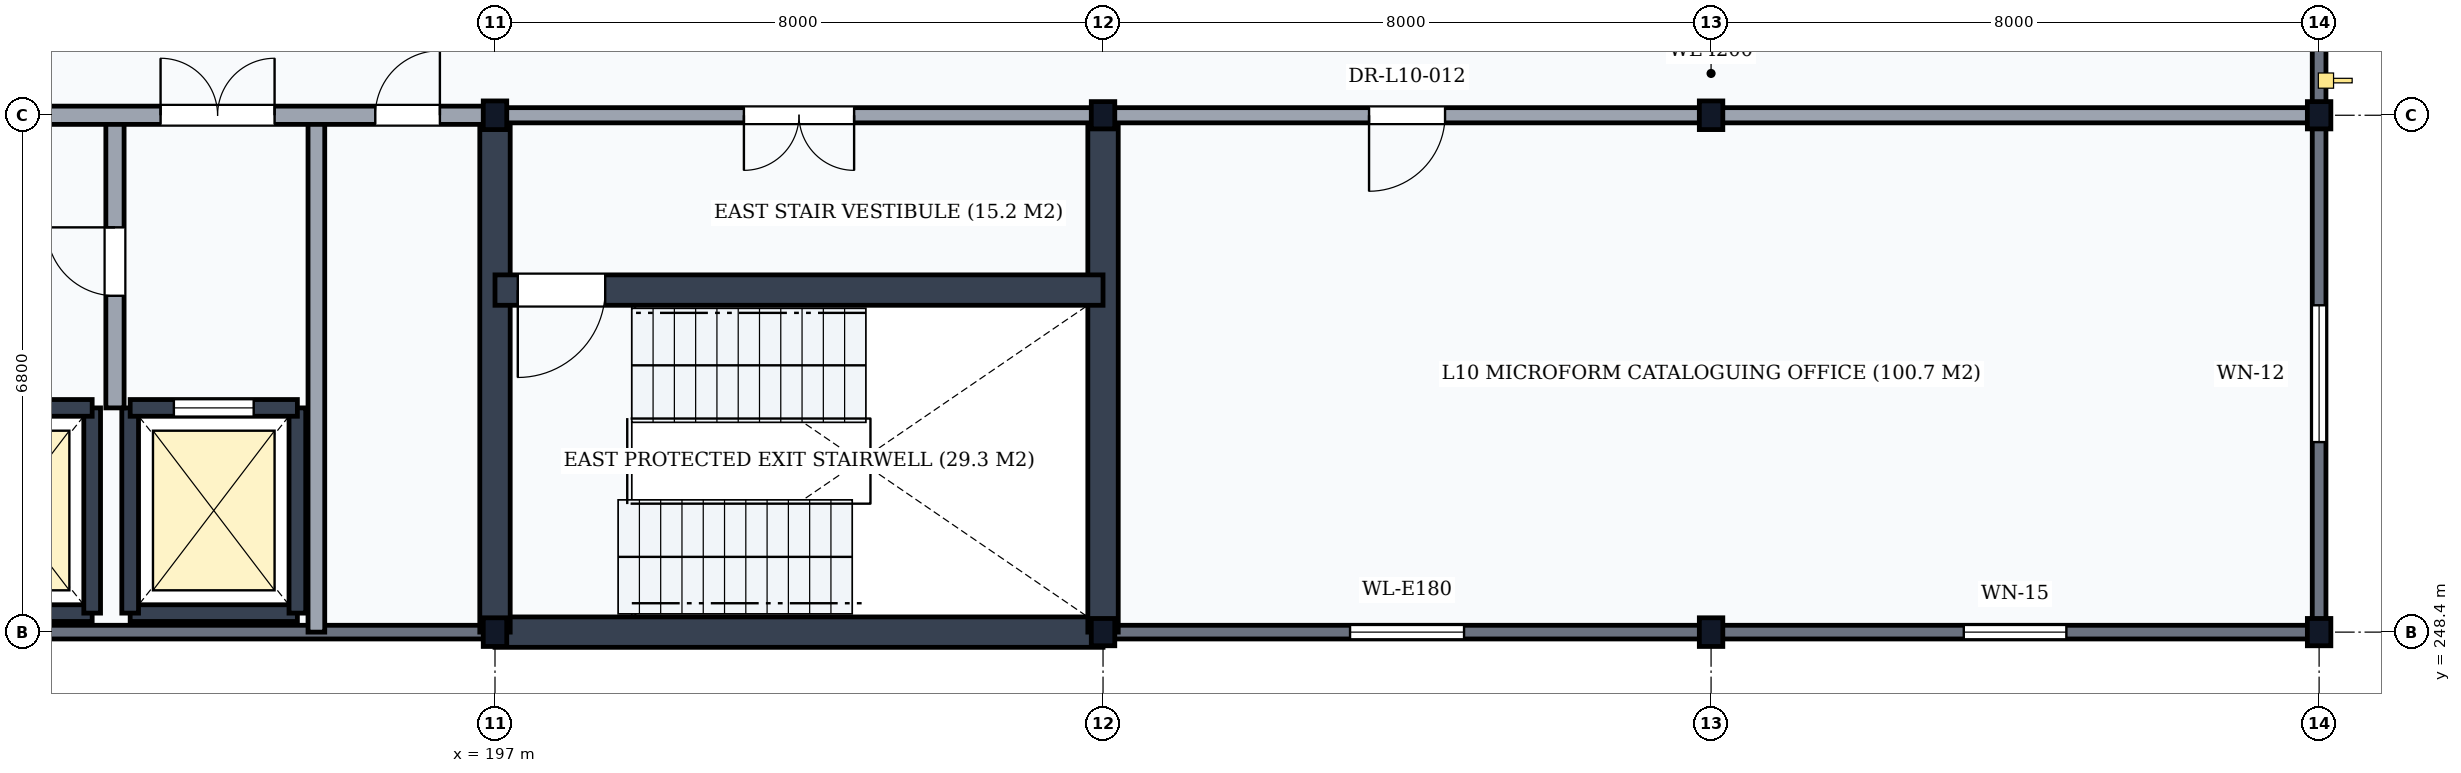
"""IFC4 building model, lengths in metres.
Left out: names, types, materials, properties, quantities, classifications, styles, units other than length and angle.
Written with IfcOpenShell. Run it as: python <this file> out.ifc"""

import sys

from ifc_helpers import new_model, si_unit, direction, frame, frame_2d, origin, origin_2d, place, context, subcontext, project, spatial, rectangle, i_section, extrude, element, fill, save


model = new_model("IFC4")
c1 = context("Model", 3, precision=1e-05, world=origin(), true_north=direction((0.0, 1.0)))
c2 = subcontext(c1, "Body", "Model", "MODEL_VIEW")
j1 = project(units=[si_unit("LENGTHUNIT", "METRE"), si_unit("PLANEANGLEUNIT", "RADIAN")], contexts=[c1])
p1 = place(None, origin())
s1 = spatial("IfcSite", under=j1, at=p1, CompositionType="ELEMENT")
p2 = place(p1, origin())
s2 = spatial("IfcBuilding", under=s1, at=p2, CompositionType="ELEMENT")
p3 = place(p2, frame((0.0, 0.0, 39.9)))
s3 = spatial("IfcBuildingStorey", under=s2, at=p3, CompositionType="ELEMENT", Elevation=39.9)
for number, where, z_axis, x_axis in (
    (1, (197.0, 248.4, 0.0), (0.0, 0.0, 1.0), (1.0, 0.0, 0.0)),
    (2, (197.0, 255.2, 0.0), (0.0, 0.0, 1.0), (1.0, 0.0, 0.0)),
):
    element("IfcColumn", number, at=place(p3, frame(where, z_axis=z_axis, x_axis=x_axis)), inside=s3, PredefinedType="COLUMN", context=c2, shape_type="SweptSolid", body=[
        extrude(i_section(OverallWidth=0.309, OverallDepth=0.377, WebThickness=0.021, FlangeThickness=0.04, FilletRadius=0.027, at=origin_2d()), origin(), (0.0, 0.0, 1.0), 3.9),
    ])
for number, where, z_axis, x_axis in (
    (3, (205.0, 248.4, 0.0), (0.0, 0.0, 1.0), (1.0, 0.0, 0.0)),
    (4, (205.0, 255.2, 0.0), (0.0, 0.0, 1.0), (1.0, 0.0, 0.0)),
):
    element("IfcColumn", number, at=place(p3, frame(where, z_axis=z_axis, x_axis=x_axis)), inside=s3, PredefinedType="COLUMN", context=c2, shape_type="SweptSolid", body=[
        extrude(i_section(OverallWidth=0.309, OverallDepth=0.359, WebThickness=0.021, FlangeThickness=0.04, FilletRadius=0.027, at=origin_2d()), origin(), (0.0, 0.0, 1.0), 3.9),
    ])
for number, where, z_axis, x_axis in (
    (5, (213.0, 248.4, 0.0), (0.0, 0.0, 1.0), (1.0, 0.0, 0.0)),
    (6, (213.0, 255.2, 0.0), (0.0, 0.0, 1.0), (1.0, 0.0, 0.0)),
):
    element("IfcColumn", number, at=place(p3, frame(where, z_axis=z_axis, x_axis=x_axis)), inside=s3, PredefinedType="COLUMN", context=c2, shape_type="SweptSolid", body=[
        extrude(i_section(OverallWidth=0.309, OverallDepth=0.377, WebThickness=0.021, FlangeThickness=0.04, FilletRadius=0.027, at=origin_2d()), origin(), (0.0, 0.0, 1.0), 3.9),
    ])
for number, where, z_axis, x_axis in (
    (7, (221.0, 248.4, 0.0), (0.0, 0.0, 1.0), (1.0, 0.0, 0.0)),
    (8, (221.0, 255.2, 0.0), (0.0, 0.0, 1.0), (1.0, 0.0, 0.0)),
):
    element("IfcColumn", number, at=place(p3, frame(where, z_axis=z_axis, x_axis=x_axis)), inside=s3, PredefinedType="COLUMN", context=c2, shape_type="SweptSolid", body=[
        extrude(i_section(OverallWidth=0.309, OverallDepth=0.359, WebThickness=0.021, FlangeThickness=0.04, FilletRadius=0.027, at=origin_2d()), origin(), (0.0, 0.0, 1.0), 3.9),
    ])
p4 = place(p3, frame((189.006, 248.4, 0.0), z_axis=(0.0, 0.0, 1.0), x_axis=(1.0, 0.0, 0.0)))
e9 = element("IfcWall", 9, at=p4, inside=s3, PredefinedType="SOLIDWALL", context=c2, shape_type="SweptSolid", body=[
    extrude(rectangle(XDim=7.988, YDim=0.18, at=frame_2d((3.994, 0.0))), origin(), (0.0, 0.0, 1.0), 3.368),
])
p5 = place(p3, frame((205.006, 248.4, 0.0), z_axis=(0.0, 0.0, 1.0), x_axis=(1.0, 0.0, 0.0)))
e10 = element("IfcWall", 10, at=p5, inside=s3, PredefinedType="SOLIDWALL", context=c2, shape_type="SweptSolid", body=[
    extrude(rectangle(XDim=7.988, YDim=0.18, at=frame_2d((3.994, 0.0))), origin(), (0.0, 0.0, 1.0), 3.368),
])
p6 = place(p5, frame((3.244, 0.0, 0.95)))
e11 = element("IfcOpeningElement", 11, at=p6, cuts=e10, PredefinedType="OPENING", context=c2, shape_type="SweptSolid", body=[
    extrude(rectangle(XDim=1.5, YDim=1.9, at=frame_2d((0.75, 0.95))), frame((0.0, 0.105, 0.0), z_axis=(0.0, -1.0, 0.0), x_axis=(1.0, 0.0, 0.0)), (0.0, 0.0, 1.0), 0.21),
])
p7 = place(p3, frame((213.006, 248.4, 0.0), z_axis=(0.0, 0.0, 1.0), x_axis=(1.0, 0.0, 0.0)))
e12 = element("IfcWall", 12, at=p7, inside=s3, PredefinedType="SOLIDWALL", context=c2, shape_type="SweptSolid", body=[
    extrude(rectangle(XDim=7.988, YDim=0.18, at=frame_2d((3.994, 0.0))), origin(), (0.0, 0.0, 1.0), 3.368),
])
p8 = place(p7, frame((3.319, 0.0, 0.95)))
e13 = element("IfcOpeningElement", 13, at=p8, cuts=e12, PredefinedType="OPENING", context=c2, shape_type="SweptSolid", body=[
    extrude(rectangle(XDim=1.35, YDim=1.8, at=frame_2d((0.675, 0.9))), frame((0.0, 0.105, 0.0), z_axis=(0.0, -1.0, 0.0), x_axis=(1.0, 0.0, 0.0)), (0.0, 0.0, 1.0), 0.21),
])
p9 = place(p3, frame((221.0, 248.406, 0.0), z_axis=(0.0, 0.0, 1.0), x_axis=(0.0, 1.0, 0.0)))
e14 = element("IfcWall", 14, at=p9, inside=s3, PredefinedType="SOLIDWALL", context=c2, shape_type="SweptSolid", body=[
    extrude(rectangle(XDim=6.788, YDim=0.18, at=frame_2d((3.394, 0.0))), origin(), (0.0, 0.0, 1.0), 3.448),
])
p10 = place(p9, frame((2.494, 0.0, 0.95)))
e15 = element("IfcOpeningElement", 15, at=p10, cuts=e14, PredefinedType="OPENING", context=c2, shape_type="SweptSolid", body=[
    extrude(rectangle(XDim=1.8, YDim=2.0, at=frame_2d((0.9, 1.0))), frame((0.0, 0.105, 0.0), z_axis=(0.0, -1.0, 0.0), x_axis=(1.0, 0.0, 0.0)), (0.0, 0.0, 1.0), 0.21),
])
p11 = place(p3, frame((221.0, 255.206, 0.0), z_axis=(0.0, 0.0, 1.0), x_axis=(0.0, 1.0, 0.0)))
e16 = element("IfcWall", 16, at=p11, inside=s3, PredefinedType="SOLIDWALL", context=c2, shape_type="SweptSolid", body=[
    extrude(rectangle(XDim=7.588, YDim=0.18, at=frame_2d((3.794, 0.0))), origin(), (0.0, 0.0, 1.0), 3.408),
])
p12 = place(p11, frame((4.266, 0.0, 0.95)))
e17 = element("IfcOpeningElement", 17, at=p12, cuts=e16, PredefinedType="OPENING", context=c2, shape_type="SweptSolid", body=[
    extrude(rectangle(XDim=1.6, YDim=2.0, at=frame_2d((0.8, 1.0))), frame((0.0, 0.105, 0.0), z_axis=(0.0, -1.0, 0.0), x_axis=(1.0, 0.0, 0.0)), (0.0, 0.0, 1.0), 0.21),
])
p13 = place(p3, frame((197.0, 248.4, 0.0), z_axis=(0.0, 0.0, 1.0), x_axis=(1.0, 0.0, 0.0)))
e18 = element("IfcWall", 18, at=p13, inside=s3, PredefinedType="SHEAR", context=c2, shape_type="SweptSolid", body=[
    extrude(rectangle(XDim=8.0, YDim=0.4, at=frame_2d((4.0, 0.0))), origin(), (0.0, 0.0, 1.0), 3.68),
])
for number, where, z_axis, x_axis in (
    (19, (197.0, 248.4, 0.0), (0.0, 0.0, 1.0), (0.0, 1.0, 0.0)),
    (20, (205.0, 248.4, 0.0), (0.0, 0.0, 1.0), (0.0, 1.0, 0.0)),
):
    element("IfcWall", number, at=place(p3, frame(where, z_axis=z_axis, x_axis=x_axis)), inside=s3, PredefinedType="SHEAR", context=c2, shape_type="SweptSolid", body=[
        extrude(rectangle(XDim=6.8, YDim=0.4, at=frame_2d((3.4, 0.0))), origin(), (0.0, 0.0, 1.0), 3.68),
    ])
p14 = place(p3, frame((197.0, 252.9, 0.0), z_axis=(0.0, 0.0, 1.0), x_axis=(1.0, 0.0, 0.0)))
e21 = element("IfcWall", 21, at=p14, inside=s3, PredefinedType="SHEAR", context=c2, shape_type="SweptSolid", body=[
    extrude(rectangle(XDim=8.0, YDim=0.4, at=frame_2d((4.0, 0.0))), origin(), (0.0, 0.0, 1.0), 3.68),
])
p15 = place(p14, frame((0.3, 0.0, 0.0)))
e22 = element("IfcOpeningElement", 22, at=p15, cuts=e21, PredefinedType="OPENING", context=c2, shape_type="SweptSolid", body=[
    extrude(rectangle(XDim=1.15, YDim=2.15, at=frame_2d((0.575, 1.075))), frame((0.0, 0.215, 0.0), z_axis=(0.0, -1.0, 0.0), x_axis=(1.0, 0.0, 0.0)), (0.0, 0.0, 1.0), 0.43),
])
p16 = place(p3, frame((197.0, 255.2, 0.0), z_axis=(0.0, 0.0, 1.0), x_axis=(1.0, 0.0, 0.0)))
e23 = element("IfcWall", 23, at=p16, inside=s3, PredefinedType="PARTITIONING", context=c2, shape_type="SweptSolid", body=[
    extrude(rectangle(XDim=8.0, YDim=0.2, at=frame_2d((4.0, 0.0))), origin(), (0.0, 0.0, 1.0), 3.178),
])
p17 = place(p16, frame((3.275, 0.0, 0.0)))
e24 = element("IfcOpeningElement", 24, at=p17, cuts=e23, PredefinedType="OPENING", context=c2, shape_type="SweptSolid", body=[
    extrude(rectangle(XDim=1.45, YDim=2.2, at=frame_2d((0.725, 1.1))), frame((0.0, 0.115, 0.0), z_axis=(0.0, -1.0, 0.0), x_axis=(1.0, 0.0, 0.0)), (0.0, 0.0, 1.0), 0.23),
])
p18 = place(p3, frame((189.5, 248.65, 0.0), z_axis=(0.0, 0.0, 1.0), x_axis=(1.0, 0.0, 0.0)))
e25 = element("IfcWall", 25, at=p18, inside=s3, PredefinedType="SHEAR", context=c2, shape_type="SweptSolid", body=[
    extrude(rectangle(XDim=2.2, YDim=0.22, at=frame_2d((1.1, 0.0))), origin(), (0.0, 0.0, 1.0), 3.68),
])
p19 = place(p3, frame((191.7, 248.65, 0.0), z_axis=(0.0, 0.0, 1.0), x_axis=(0.0, 1.0, 0.0)))
e26 = element("IfcWall", 26, at=p19, inside=s3, PredefinedType="SHEAR", context=c2, shape_type="SweptSolid", body=[
    extrude(rectangle(XDim=2.7, YDim=0.22, at=frame_2d((1.35, 0.0))), origin(), (0.0, 0.0, 1.0), 3.68),
])
p20 = place(p3, frame((189.5, 251.35, 0.0), z_axis=(0.0, 0.0, 1.0), x_axis=(1.0, 0.0, 0.0)))
e27 = element("IfcWall", 27, at=p20, inside=s3, PredefinedType="SHEAR", context=c2, shape_type="SweptSolid", body=[
    extrude(rectangle(XDim=2.2, YDim=0.22, at=frame_2d((1.1, 0.0))), origin(), (0.0, 0.0, 1.0), 3.68),
])
p21 = place(p20, frame((0.55, 0.0, 0.0)))
e28 = element("IfcOpeningElement", 28, at=p21, cuts=e27, PredefinedType="OPENING", context=c2, shape_type="SweptSolid", body=[
    extrude(rectangle(XDim=1.1, YDim=2.15, at=frame_2d((0.55, 1.075))), frame((0.0, 0.125, 0.0), z_axis=(0.0, -1.0, 0.0), x_axis=(1.0, 0.0, 0.0)), (0.0, 0.0, 1.0), 0.25),
])
p22 = place(p3, frame((192.2, 248.65, 0.0), z_axis=(0.0, 0.0, 1.0), x_axis=(1.0, 0.0, 0.0)))
e29 = element("IfcWall", 29, at=p22, inside=s3, PredefinedType="SHEAR", context=c2, shape_type="SweptSolid", body=[
    extrude(rectangle(XDim=2.2, YDim=0.22, at=frame_2d((1.1, 0.0))), origin(), (0.0, 0.0, 1.0), 3.68),
])
for number, where, z_axis, x_axis in (
    (30, (192.2, 248.65, 0.0), (0.0, 0.0, 1.0), (0.0, 1.0, 0.0)),
    (31, (194.4, 248.65, 0.0), (0.0, 0.0, 1.0), (0.0, 1.0, 0.0)),
):
    element("IfcWall", number, at=place(p3, frame(where, z_axis=z_axis, x_axis=x_axis)), inside=s3, PredefinedType="SHEAR", context=c2, shape_type="SweptSolid", body=[
        extrude(rectangle(XDim=2.7, YDim=0.22, at=frame_2d((1.35, 0.0))), origin(), (0.0, 0.0, 1.0), 3.68),
    ])
p23 = place(p3, frame((192.2, 251.35, 0.0), z_axis=(0.0, 0.0, 1.0), x_axis=(1.0, 0.0, 0.0)))
e32 = element("IfcWall", 32, at=p23, inside=s3, PredefinedType="SHEAR", context=c2, shape_type="SweptSolid", body=[
    extrude(rectangle(XDim=2.2, YDim=0.22, at=frame_2d((1.1, 0.0))), origin(), (0.0, 0.0, 1.0), 3.68),
])
p24 = place(p23, frame((0.575, 0.0, 0.0)))
e33 = element("IfcOpeningElement", 33, at=p24, cuts=e32, PredefinedType="OPENING", context=c2, shape_type="SweptSolid", body=[
    extrude(rectangle(XDim=1.05, YDim=2.15, at=frame_2d((0.525, 1.075))), frame((0.0, 0.125, 0.0), z_axis=(0.0, -1.0, 0.0), x_axis=(1.0, 0.0, 0.0)), (0.0, 0.0, 1.0), 0.25),
])
p25 = place(p3, frame((192.0, 251.35, 0.0), z_axis=(0.0, 0.0, 1.0), x_axis=(0.0, 1.0, 0.0)))
e34 = element("IfcWall", 34, at=p25, inside=s3, PredefinedType="PARTITIONING", context=c2, shape_type="SweptSolid", body=[
    extrude(rectangle(XDim=3.85, YDim=0.24, at=frame_2d((1.925, 0.0))), origin(), (0.0, 0.0, 1.0), 3.68),
])
p26 = place(p25, frame((1.475, 0.0, 0.0)))
e35 = element("IfcOpeningElement", 35, at=p26, cuts=e34, PredefinedType="OPENING", context=c2, shape_type="SweptSolid", body=[
    extrude(rectangle(XDim=0.9, YDim=2.1, at=frame_2d((0.45, 1.05))), frame((0.0, 0.135, 0.0), z_axis=(0.0, -1.0, 0.0), x_axis=(1.0, 0.0, 0.0)), (0.0, 0.0, 1.0), 0.27),
])
p27 = place(p3, frame((194.65, 248.4, 0.0), z_axis=(0.0, 0.0, 1.0), x_axis=(0.0, 1.0, 0.0)))
e36 = element("IfcWall", 36, at=p27, inside=s3, PredefinedType="PARTITIONING", context=c2, shape_type="SweptSolid", body=[
    extrude(rectangle(XDim=6.8, YDim=0.22, at=frame_2d((3.4, 0.0))), origin(), (0.0, 0.0, 1.0), 3.68),
])
p28 = place(p3, frame((189.0, 255.2, 0.0), z_axis=(0.0, 0.0, 1.0), x_axis=(1.0, 0.0, 0.0)))
e37 = element("IfcWall", 37, at=p28, inside=s3, PredefinedType="PARTITIONING", context=c2, shape_type="SweptSolid", body=[
    extrude(rectangle(XDim=8.0, YDim=0.24, at=frame_2d((4.0, 0.0))), origin(), (0.0, 0.0, 1.0), 3.178),
])
p29 = place(p28, frame((1.05, 0.0, 0.0)))
e38 = element("IfcOpeningElement", 38, at=p29, cuts=e37, PredefinedType="OPENING", context=c2, shape_type="SweptSolid", body=[
    extrude(rectangle(XDim=1.0, YDim=2.1, at=frame_2d((0.5, 1.05))), frame((0.0, 0.135, 0.0), z_axis=(0.0, -1.0, 0.0), x_axis=(1.0, 0.0, 0.0)), (0.0, 0.0, 1.0), 0.27),
])
p30 = place(p28, frame((3.6, 0.0, 0.0)))
e39 = element("IfcOpeningElement", 39, at=p30, cuts=e37, PredefinedType="OPENING", context=c2, shape_type="SweptSolid", body=[
    extrude(rectangle(XDim=1.5, YDim=2.25, at=frame_2d((0.75, 1.125))), frame((0.0, 0.135, 0.0), z_axis=(0.0, -1.0, 0.0), x_axis=(1.0, 0.0, 0.0)), (0.0, 0.0, 1.0), 0.27),
])
p31 = place(p28, frame((6.425, 0.0, 0.0)))
e40 = element("IfcOpeningElement", 40, at=p31, cuts=e37, PredefinedType="OPENING", context=c2, shape_type="SweptSolid", body=[
    extrude(rectangle(XDim=0.85, YDim=2.1, at=frame_2d((0.425, 1.05))), frame((0.0, 0.135, 0.0), z_axis=(0.0, -1.0, 0.0), x_axis=(1.0, 0.0, 0.0)), (0.0, 0.0, 1.0), 0.27),
])
p32 = place(p3, frame((205.0, 255.2, 0.0), z_axis=(0.0, 0.0, 1.0), x_axis=(1.0, 0.0, 0.0)))
e41 = element("IfcWall", 41, at=p32, inside=s3, PredefinedType="PARTITIONING", context=c2, shape_type="SweptSolid", body=[
    extrude(rectangle(XDim=16.0, YDim=0.2, at=frame_2d((8.0, 0.0))), origin(), (0.0, 0.0, 1.0), 3.178),
])
p33 = place(p32, frame((3.5, 0.0, 0.0)))
e42 = element("IfcOpeningElement", 42, at=p33, cuts=e41, PredefinedType="OPENING", context=c2, shape_type="SweptSolid", body=[
    extrude(rectangle(XDim=1.0, YDim=2.1, at=frame_2d((0.5, 1.05))), frame((0.0, 0.115, 0.0), z_axis=(0.0, -1.0, 0.0), x_axis=(1.0, 0.0, 0.0)), (0.0, 0.0, 1.0), 0.23),
])
p34 = place(p6, origin())
e43 = element("IfcWindow", 43, at=p34, inside=s3, PartitioningType="SINGLE_PANEL", PredefinedType="WINDOW", context=c2, shape_type="SweptSolid", body=[
    extrude(rectangle(XDim=1.5, YDim=1.9, at=frame_2d((0.75, 0.95))), frame((0.0, 0.03, 0.0), z_axis=(0.0, -1.0, 0.0), x_axis=(1.0, 0.0, 0.0)), (0.0, 0.0, 1.0), 0.06),
])
fill(e11, e43)
p35 = place(p8, origin())
e44 = element("IfcWindow", 44, at=p35, inside=s3, PartitioningType="SINGLE_PANEL", PredefinedType="WINDOW", context=c2, shape_type="SweptSolid", body=[
    extrude(rectangle(XDim=1.35, YDim=1.8, at=frame_2d((0.675, 0.9))), frame((0.0, 0.03, 0.0), z_axis=(0.0, -1.0, 0.0), x_axis=(1.0, 0.0, 0.0)), (0.0, 0.0, 1.0), 0.06),
])
fill(e13, e44)
p36 = place(p10, origin())
e45 = element("IfcWindow", 45, at=p36, inside=s3, PartitioningType="DOUBLE_PANEL_VERTICAL", PredefinedType="WINDOW", context=c2, shape_type="SweptSolid", body=[
    extrude(rectangle(XDim=1.8, YDim=2.0, at=frame_2d((0.9, 1.0))), frame((0.0, 0.03, 0.0), z_axis=(0.0, -1.0, 0.0), x_axis=(1.0, 0.0, 0.0)), (0.0, 0.0, 1.0), 0.06),
])
fill(e15, e45)
p37 = place(p15, frame((1.15, 0.0, 0.0), z_axis=(0.0, 0.0, 1.0), x_axis=(-1.0, 0.0, 0.0)))
e46 = element("IfcDoor", 46, at=p37, inside=s3, OperationType="SINGLE_SWING_RIGHT", PredefinedType="DOOR", context=c2, shape_type="SweptSolid", body=[
    extrude(rectangle(XDim=1.15, YDim=2.15, at=frame_2d((0.575, 1.075))), frame((0.0, 0.025, 0.0), z_axis=(0.0, -1.0, 0.0), x_axis=(1.0, 0.0, 0.0)), (0.0, 0.0, 1.0), 0.05),
])
fill(e22, e46)
p38 = place(p17, frame((1.45, 0.0, 0.0), z_axis=(0.0, 0.0, 1.0), x_axis=(-1.0, 0.0, 0.0)))
e47 = element("IfcDoor", 47, at=p38, inside=s3, OperationType="DOUBLE_DOOR_SINGLE_SWING", PredefinedType="DOOR", context=c2, shape_type="SweptSolid", body=[
    extrude(rectangle(XDim=1.45, YDim=2.2, at=frame_2d((0.725, 1.1))), frame((0.0, 0.025, 0.0), z_axis=(0.0, -1.0, 0.0), x_axis=(1.0, 0.0, 0.0)), (0.0, 0.0, 1.0), 0.05),
])
fill(e24, e47)
p39 = place(p24, origin())
e48 = element("IfcDoor", 48, at=p39, inside=s3, OperationType="DOUBLE_DOOR_SLIDING", PredefinedType="USERDEFINED", context=c2, shape_type="SweptSolid", body=[
    extrude(rectangle(XDim=1.05, YDim=2.15, at=frame_2d((0.525, 1.075))), frame((0.0, 0.025, 0.0), z_axis=(0.0, -1.0, 0.0), x_axis=(1.0, 0.0, 0.0)), (0.0, 0.0, 1.0), 0.05),
])
fill(e33, e48)
p40 = place(p26, frame((0.9, 0.0, 0.0), z_axis=(0.0, 0.0, 1.0), x_axis=(-1.0, 0.0, 0.0)))
e49 = element("IfcDoor", 49, at=p40, inside=s3, OperationType="SINGLE_SWING_LEFT", PredefinedType="DOOR", context=c2, shape_type="SweptSolid", body=[
    extrude(rectangle(XDim=0.9, YDim=2.1, at=frame_2d((0.45, 1.05))), frame((0.0, 0.025, 0.0), z_axis=(0.0, -1.0, 0.0), x_axis=(1.0, 0.0, 0.0)), (0.0, 0.0, 1.0), 0.05),
])
fill(e35, e49)
p41 = place(p30, origin())
e50 = element("IfcDoor", 50, at=p41, inside=s3, OperationType="DOUBLE_DOOR_SINGLE_SWING", PredefinedType="DOOR", context=c2, shape_type="SweptSolid", body=[
    extrude(rectangle(XDim=1.5, YDim=2.25, at=frame_2d((0.75, 1.125))), frame((0.0, 0.025, 0.0), z_axis=(0.0, -1.0, 0.0), x_axis=(1.0, 0.0, 0.0)), (0.0, 0.0, 1.0), 0.05),
])
fill(e39, e50)
p42 = place(p31, frame((0.85, 0.0, 0.0), z_axis=(0.0, 0.0, 1.0), x_axis=(-1.0, 0.0, 0.0)))
e51 = element("IfcDoor", 51, at=p42, inside=s3, OperationType="SINGLE_SWING_LEFT", PredefinedType="DOOR", context=c2, shape_type="SweptSolid", body=[
    extrude(rectangle(XDim=0.85, YDim=2.1, at=frame_2d((0.425, 1.05))), frame((0.0, 0.025, 0.0), z_axis=(0.0, -1.0, 0.0), x_axis=(1.0, 0.0, 0.0)), (0.0, 0.0, 1.0), 0.05),
])
fill(e40, e51)
p43 = place(p33, frame((1.0, 0.0, 0.0), z_axis=(0.0, 0.0, 1.0), x_axis=(-1.0, 0.0, 0.0)))
e52 = element("IfcDoor", 52, at=p43, inside=s3, OperationType="SINGLE_SWING_RIGHT", PredefinedType="DOOR", context=c2, shape_type="SweptSolid", body=[
    extrude(rectangle(XDim=1.0, YDim=2.1, at=frame_2d((0.5, 1.05))), frame((0.0, 0.025, 0.0), z_axis=(0.0, -1.0, 0.0), x_axis=(1.0, 0.0, 0.0)), (0.0, 0.0, 1.0), 0.05),
])
fill(e42, e52)
save(model, sys.argv[1])
